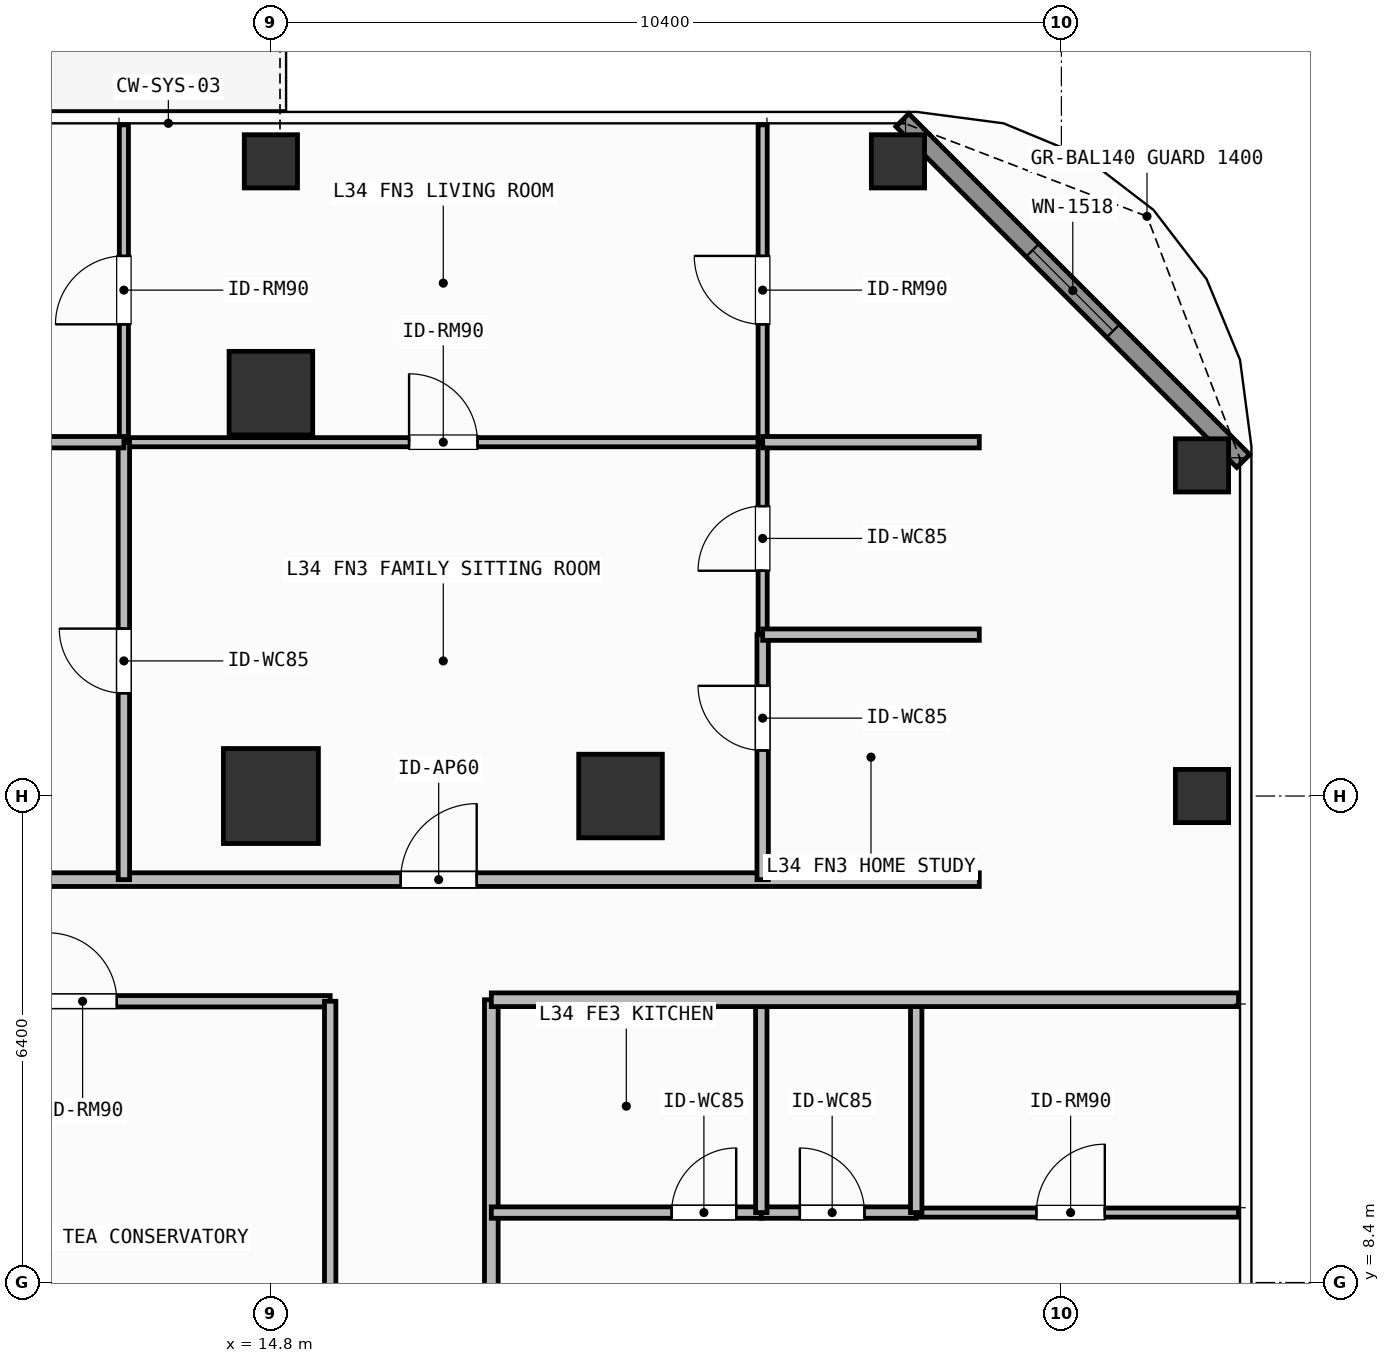
"""IFC4 building model, lengths in metres.
Left out: names, types, materials, properties, quantities, classifications, styles, units other than length and angle.
Written with IfcOpenShell. Run it as: python <this file> out.ifc"""

import sys

from ifc_helpers import new_model, si_unit, direction, frame, frame_2d, origin, origin_2d, place, context, subcontext, project, spatial, rectangle, hollow_rectangle, extrude, element, fill, save


model = new_model("IFC4")
c1 = context("Model", 3, precision=1e-05, world=origin(), true_north=direction((0.0, 1.0)))
c2 = subcontext(c1, "Body", "Model", "MODEL_VIEW")
j1 = project(units=[si_unit("LENGTHUNIT", "METRE"), si_unit("PLANEANGLEUNIT", "RADIAN")], contexts=[c1])
p1 = place(None, origin())
s1 = spatial("IfcSite", under=j1, at=p1, CompositionType="ELEMENT")
p2 = place(p1, origin())
s2 = spatial("IfcBuilding", under=s1, at=p2, CompositionType="ELEMENT")
p3 = place(p2, frame((0.0, 0.0, 136.8)))
s3 = spatial("IfcBuildingStorey", under=s2, at=p3, CompositionType="ELEMENT", Elevation=136.8)
p4 = place(p3, frame((14.8, 14.8, 0.0), z_axis=(0.0, 0.0, 1.0), x_axis=(1.0, 0.0, 0.0)))
e1 = element("IfcColumn", 1, at=p4, inside=s3, PredefinedType="COLUMN", context=c2, shape_type="SweptSolid", body=[
    extrude(rectangle(XDim=1.25, YDim=1.25, at=origin_2d()), origin(), (0.0, 0.0, 1.0), 3.9),
])
for number, where, z_axis, x_axis in (
    (2, (19.4, 14.8, 0.0), (0.0, 0.0, 1.0), (1.0, 0.0, 0.0)),
    (3, (14.8, 20.1, 0.0), (0.0, 0.0, 1.0), (1.0, 0.0, 0.0)),
):
    element("IfcColumn", number, at=place(p3, frame(where, z_axis=z_axis, x_axis=x_axis)), inside=s3, PredefinedType="COLUMN", context=c2, shape_type="SweptSolid", body=[
        extrude(rectangle(XDim=1.1, YDim=1.1, at=origin_2d()), origin(), (0.0, 0.0, 1.0), 3.9),
    ])
for number, where, z_axis, x_axis in (
    (4, (23.05, 23.15, 0.0), (0.0, 0.0, 1.0), (1.0, 0.0, 0.0)),
    (5, (27.05, 19.15, 0.0), (0.0, 0.0, 1.0), (1.0, 0.0, 0.0)),
    (6, (14.8, 23.15, 0.0), (0.0, 0.0, 1.0), (1.0, 0.0, 0.0)),
    (7, (27.05, 14.8, 0.0), (0.0, 0.0, 1.0), (1.0, 0.0, 0.0)),
):
    element("IfcColumn", number, at=place(p3, frame(where, z_axis=z_axis, x_axis=x_axis)), inside=s3, PredefinedType="COLUMN", context=c2, shape_type="SweptSolid", body=[
        extrude(hollow_rectangle(XDim=0.7, YDim=0.7, WallThickness=0.032, at=origin_2d()), origin(), (0.0, 0.0, 1.0), 3.9),
    ])
p5 = place(p3, frame((23.108, 23.692, 0.0), z_axis=(0.0, 0.0, 1.0), x_axis=(0.707087534163, -0.707126027686, 0.0)))
e8 = element("IfcWall", 8, at=p5, inside=s3, PredefinedType="SOLIDWALL", context=c2, shape_type="SweptSolid", body=[
    extrude(rectangle(XDim=6.342, YDim=0.24, at=frame_2d((3.171, 0.0))), origin(), (0.0, 0.0, 1.0), 3.68),
])
p6 = place(p5, frame((2.421, 0.0, 0.8)))
e9 = element("IfcOpeningElement", 9, at=p6, cuts=e8, PredefinedType="OPENING", context=c2, shape_type="SweptSolid", body=[
    extrude(rectangle(XDim=1.5, YDim=1.85, at=frame_2d((0.75, 0.925))), frame((0.0, 0.13, 0.0), z_axis=(0.0, -1.0, 0.0), x_axis=(1.0, 0.0, 0.0)), (0.0, 0.0, 1.0), 0.26),
])
p7 = place(p3, frame((8.36, 12.1, 0.0), z_axis=(0.0, 0.0, 1.0), x_axis=(1.0, 0.0, 0.0)))
e10 = element("IfcWall", 10, at=p7, inside=s3, PredefinedType="PARTITIONING", context=c2, shape_type="SweptSolid", body=[
    extrude(rectangle(XDim=7.22, YDim=0.15, at=frame_2d((3.61, 0.0))), origin(), (0.0, 0.0, 1.0), 3.68),
])
p8 = place(p7, frame((3.513, 0.0, 0.0)))
e11 = element("IfcOpeningElement", 11, at=p8, cuts=e10, PredefinedType="OPENING", context=c2, shape_type="SweptSolid", body=[
    extrude(rectangle(XDim=0.9, YDim=2.1, at=frame_2d((0.45, 1.05))), frame((0.0, 0.085, 0.0), z_axis=(0.0, -1.0, 0.0), x_axis=(1.0, 0.0, 0.0)), (0.0, 0.0, 1.0), 0.17),
])
p9 = place(p3, frame((8.82, 13.7, 0.0), z_axis=(0.0, 0.0, 1.0), x_axis=(1.0, 0.0, 0.0)))
e12 = element("IfcWall", 12, at=p9, inside=s3, PredefinedType="PARTITIONING", context=c2, shape_type="SweptSolid", body=[
    extrude(rectangle(XDim=15.3, YDim=0.18, at=frame_2d((7.65, 0.0))), origin(), (0.0, 0.0, 1.0), 3.68),
])
p10 = place(p9, frame((7.688, 0.0, 0.0)))
e13 = element("IfcOpeningElement", 13, at=p10, cuts=e12, PredefinedType="OPENING", context=c2, shape_type="SweptSolid", body=[
    extrude(rectangle(XDim=1.0, YDim=2.2, at=frame_2d((0.5, 1.1))), frame((0.0, 0.1, 0.0), z_axis=(0.0, -1.0, 0.0), x_axis=(1.0, 0.0, 0.0)), (0.0, 0.0, 1.0), 0.2),
])
p11 = place(p3, frame((12.866, 19.455, 0.0), z_axis=(0.0, 0.0, 1.0), x_axis=(1.0, 0.0, 0.0)))
e14 = element("IfcWall", 14, at=p11, inside=s3, PredefinedType="PARTITIONING", context=c2, shape_type="SweptSolid", body=[
    extrude(rectangle(XDim=8.404, YDim=0.12, at=frame_2d((4.202, 0.0))), origin(), (0.0, 0.0, 1.0), 3.68),
])
p12 = place(p11, frame((3.752, 0.0, 0.0)))
e15 = element("IfcOpeningElement", 15, at=p12, cuts=e14, PredefinedType="OPENING", context=c2, shape_type="SweptSolid", body=[
    extrude(rectangle(XDim=0.9, YDim=2.1, at=frame_2d((0.45, 1.05))), frame((0.0, 0.07, 0.0), z_axis=(0.0, -1.0, 0.0), x_axis=(1.0, 0.0, 0.0)), (0.0, 0.0, 1.0), 0.14),
])
p13 = place(p3, frame((12.866, 13.7, 0.0), z_axis=(0.0, 0.0, 1.0), x_axis=(0.0, 1.0, 0.0)))
e16 = element("IfcWall", 16, at=p13, inside=s3, PredefinedType="PARTITIONING", context=c2, shape_type="SweptSolid", body=[
    extrude(rectangle(XDim=5.755, YDim=0.15, at=frame_2d((2.877, 0.0))), origin(), (0.0, 0.0, 1.0), 3.68),
])
p14 = place(p13, frame((2.452, 0.0, 0.0)))
e17 = element("IfcOpeningElement", 17, at=p14, cuts=e16, PredefinedType="OPENING", context=c2, shape_type="SweptSolid", body=[
    extrude(rectangle(XDim=0.85, YDim=2.1, at=frame_2d((0.425, 1.05))), frame((0.0, 0.085, 0.0), z_axis=(0.0, -1.0, 0.0), x_axis=(1.0, 0.0, 0.0)), (0.0, 0.0, 1.0), 0.17),
])
p15 = place(p3, frame((12.866, 19.455, 0.0), z_axis=(0.0, 0.0, 1.0), x_axis=(0.0, 1.0, 0.0)))
e18 = element("IfcWall", 18, at=p15, inside=s3, PredefinedType="PARTITIONING", context=c2, shape_type="SweptSolid", body=[
    extrude(rectangle(XDim=4.175, YDim=0.12, at=frame_2d((2.087, 0.0))), origin(), (0.0, 0.0, 1.0), 3.68),
])
p16 = place(p15, frame((1.551, 0.0, 0.0)))
e19 = element("IfcOpeningElement", 19, at=p16, cuts=e18, PredefinedType="OPENING", context=c2, shape_type="SweptSolid", body=[
    extrude(rectangle(XDim=0.9, YDim=2.1, at=frame_2d((0.45, 1.05))), frame((0.0, 0.07, 0.0), z_axis=(0.0, -1.0, 0.0), x_axis=(1.0, 0.0, 0.0)), (0.0, 0.0, 1.0), 0.14),
])
p17 = place(p3, frame((21.27, 13.7, 0.0), z_axis=(0.0, 0.0, 1.0), x_axis=(0.0, 1.0, 0.0)))
e20 = element("IfcWall", 20, at=p17, inside=s3, PredefinedType="PARTITIONING", context=c2, shape_type="SweptSolid", body=[
    extrude(rectangle(XDim=3.223, YDim=0.15, at=frame_2d((1.612, 0.0))), origin(), (0.0, 0.0, 1.0), 3.68),
])
p18 = place(p17, frame((1.7, 0.0, 0.0)))
e21 = element("IfcOpeningElement", 21, at=p18, cuts=e20, PredefinedType="OPENING", context=c2, shape_type="SweptSolid", body=[
    extrude(rectangle(XDim=0.85, YDim=2.1, at=frame_2d((0.425, 1.05))), frame((0.0, 0.085, 0.0), z_axis=(0.0, -1.0, 0.0), x_axis=(1.0, 0.0, 0.0)), (0.0, 0.0, 1.0), 0.17),
])
p19 = place(p3, frame((21.27, 16.923, 0.0), z_axis=(0.0, 0.0, 1.0), x_axis=(0.0, 1.0, 0.0)))
e22 = element("IfcWall", 22, at=p19, inside=s3, PredefinedType="PARTITIONING", context=c2, shape_type="SweptSolid", body=[
    extrude(rectangle(XDim=2.532, YDim=0.12, at=frame_2d((1.266, 0.0))), origin(), (0.0, 0.0, 1.0), 3.68),
])
p20 = place(p19, frame((0.841, 0.0, 0.0)))
e23 = element("IfcOpeningElement", 23, at=p20, cuts=e22, PredefinedType="OPENING", context=c2, shape_type="SweptSolid", body=[
    extrude(rectangle(XDim=0.85, YDim=2.1, at=frame_2d((0.425, 1.05))), frame((0.0, 0.07, 0.0), z_axis=(0.0, -1.0, 0.0), x_axis=(1.0, 0.0, 0.0)), (0.0, 0.0, 1.0), 0.14),
])
p21 = place(p3, frame((21.27, 19.455, 0.0), z_axis=(0.0, 0.0, 1.0), x_axis=(0.0, 1.0, 0.0)))
e24 = element("IfcWall", 24, at=p21, inside=s3, PredefinedType="PARTITIONING", context=c2, shape_type="SweptSolid", body=[
    extrude(rectangle(XDim=4.175, YDim=0.12, at=frame_2d((2.087, 0.0))), origin(), (0.0, 0.0, 1.0), 3.68),
])
p22 = place(p21, frame((1.551, 0.0, 0.0)))
e25 = element("IfcOpeningElement", 25, at=p22, cuts=e24, PredefinedType="OPENING", context=c2, shape_type="SweptSolid", body=[
    extrude(rectangle(XDim=0.9, YDim=2.1, at=frame_2d((0.45, 1.05))), frame((0.0, 0.07, 0.0), z_axis=(0.0, -1.0, 0.0), x_axis=(1.0, 0.0, 0.0)), (0.0, 0.0, 1.0), 0.14),
])
p23 = place(p3, frame((17.7, 4.04, 0.0), z_axis=(0.0, 0.0, 1.0), x_axis=(0.0, 1.0, 0.0)))
e26 = element("IfcWall", 26, at=p23, inside=s3, PredefinedType="PARTITIONING", context=c2, shape_type="SweptSolid", body=[
    extrude(rectangle(XDim=8.08, YDim=0.18, at=frame_2d((4.04, 0.0))), origin(), (0.0, 0.0, 1.0), 3.68),
])
p24 = place(p23, frame((1.761, 0.0, 0.0)))
e27 = element("IfcOpeningElement", 27, at=p24, cuts=e26, PredefinedType="OPENING", context=c2, shape_type="SweptSolid", body=[
    extrude(rectangle(XDim=1.0, YDim=2.2, at=frame_2d((0.5, 1.1))), frame((0.0, 0.1, 0.0), z_axis=(0.0, -1.0, 0.0), x_axis=(1.0, 0.0, 0.0)), (0.0, 0.0, 1.0), 0.2),
])
p25 = place(p3, frame((17.7, 9.32, 0.0), z_axis=(0.0, 0.0, 1.0), x_axis=(1.0, 0.0, 0.0)))
e28 = element("IfcWall", 28, at=p25, inside=s3, PredefinedType="PARTITIONING", context=c2, shape_type="SweptSolid", body=[
    extrude(rectangle(XDim=3.552, YDim=0.15, at=frame_2d((1.776, 0.0))), origin(), (0.0, 0.0, 1.0), 3.68),
])
p26 = place(p25, frame((2.372, 0.0, 0.0)))
e29 = element("IfcOpeningElement", 29, at=p26, cuts=e28, PredefinedType="OPENING", context=c2, shape_type="SweptSolid", body=[
    extrude(rectangle(XDim=0.85, YDim=2.1, at=frame_2d((0.425, 1.05))), frame((0.0, 0.085, 0.0), z_axis=(0.0, -1.0, 0.0), x_axis=(1.0, 0.0, 0.0)), (0.0, 0.0, 1.0), 0.17),
])
p27 = place(p3, frame((21.252, 9.32, 0.0), z_axis=(0.0, 0.0, 1.0), x_axis=(1.0, 0.0, 0.0)))
e30 = element("IfcWall", 30, at=p27, inside=s3, PredefinedType="PARTITIONING", context=c2, shape_type="SweptSolid", body=[
    extrude(rectangle(XDim=2.038, YDim=0.15, at=frame_2d((1.019, 0.0))), origin(), (0.0, 0.0, 1.0), 3.68),
])
p28 = place(p27, frame((0.507, 0.0, 0.0)))
e31 = element("IfcOpeningElement", 31, at=p28, cuts=e30, PredefinedType="OPENING", context=c2, shape_type="SweptSolid", body=[
    extrude(rectangle(XDim=0.85, YDim=2.1, at=frame_2d((0.425, 1.05))), frame((0.0, 0.085, 0.0), z_axis=(0.0, -1.0, 0.0), x_axis=(1.0, 0.0, 0.0)), (0.0, 0.0, 1.0), 0.17),
])
p29 = place(p3, frame((23.29, 9.32, 0.0), z_axis=(0.0, 0.0, 1.0), x_axis=(1.0, 0.0, 0.0)))
e32 = element("IfcWall", 32, at=p29, inside=s3, PredefinedType="PARTITIONING", context=c2, shape_type="SweptSolid", body=[
    extrude(rectangle(XDim=4.24, YDim=0.12, at=frame_2d((2.12, 0.0))), origin(), (0.0, 0.0, 1.0), 3.68),
])
p30 = place(p29, frame((1.581, 0.0, 0.0)))
e33 = element("IfcOpeningElement", 33, at=p30, cuts=e32, PredefinedType="OPENING", context=c2, shape_type="SweptSolid", body=[
    extrude(rectangle(XDim=0.9, YDim=2.1, at=frame_2d((0.45, 1.05))), frame((0.0, 0.07, 0.0), z_axis=(0.0, -1.0, 0.0), x_axis=(1.0, 0.0, 0.0)), (0.0, 0.0, 1.0), 0.14),
])
p31 = place(p3, frame((15.58, 5.85, 0.0), z_axis=(0.0, 0.0, 1.0), x_axis=(0.0, 1.0, 0.0)))
e34 = element("IfcWall", 34, at=p31, inside=s3, PredefinedType="PARTITIONING", context=c2, shape_type="SweptSolid", body=[
    extrude(rectangle(XDim=6.25, YDim=0.15, at=frame_2d((3.125, 0.0))), origin(), (0.0, 0.0, 1.0), 3.68),
])
p32 = place(p3, frame((8.82, 19.455, 0.0), z_axis=(0.0, 0.0, 1.0), x_axis=(1.0, 0.0, 0.0)))
e35 = element("IfcWall", 35, at=p32, inside=s3, PredefinedType="PARTITIONING", context=c2, shape_type="SweptSolid", body=[
    extrude(rectangle(XDim=4.046, YDim=0.15, at=frame_2d((2.023, 0.0))), origin(), (0.0, 0.0, 1.0), 3.68),
])
for number, where, z_axis, x_axis in (
    (36, (21.27, 16.923, 0.0), (0.0, 0.0, 1.0), (1.0, 0.0, 0.0)),
    (37, (21.27, 19.455, 0.0), (0.0, 0.0, 1.0), (1.0, 0.0, 0.0)),
):
    element("IfcWall", number, at=place(p3, frame(where, z_axis=z_axis, x_axis=x_axis)), inside=s3, PredefinedType="PARTITIONING", context=c2, shape_type="SweptSolid", body=[
        extrude(rectangle(XDim=2.85, YDim=0.15, at=frame_2d((1.425, 0.0))), origin(), (0.0, 0.0, 1.0), 3.68),
    ])
for number, where, z_axis, x_axis in (
    (38, (21.252, 9.32, 0.0), (0.0, 0.0, 1.0), (0.0, 1.0, 0.0)),
    (39, (23.29, 9.32, 0.0), (0.0, 0.0, 1.0), (0.0, 1.0, 0.0)),
):
    element("IfcWall", number, at=place(p3, frame(where, z_axis=z_axis, x_axis=x_axis)), inside=s3, PredefinedType="PARTITIONING", context=c2, shape_type="SweptSolid", body=[
        extrude(rectangle(XDim=2.8, YDim=0.15, at=frame_2d((1.4, 0.0))), origin(), (0.0, 0.0, 1.0), 3.68),
    ])
p33 = place(p3, frame((17.7, 12.12, 0.0), z_axis=(0.0, 0.0, 1.0), x_axis=(1.0, 0.0, 0.0)))
e40 = element("IfcWall", 40, at=p33, inside=s3, PredefinedType="PARTITIONING", context=c2, shape_type="SweptSolid", body=[
    extrude(rectangle(XDim=9.83, YDim=0.18, at=frame_2d((4.915, 0.0))), origin(), (0.0, 0.0, 1.0), 3.68),
])
p34 = place(p6, origin())
e41 = element("IfcWindow", 41, at=p34, inside=s3, PartitioningType="SINGLE_PANEL", PredefinedType="WINDOW", context=c2, shape_type="SweptSolid", body=[
    extrude(rectangle(XDim=1.5, YDim=1.85, at=frame_2d((0.75, 0.925))), frame((0.0, 0.03, 0.0), z_axis=(0.0, -1.0, 0.0), x_axis=(1.0, 0.0, 0.0)), (0.0, 0.0, 1.0), 0.06),
])
fill(e9, e41)
p35 = place(p8, origin())
e42 = element("IfcDoor", 42, at=p35, inside=s3, OperationType="SINGLE_SWING_LEFT", PredefinedType="DOOR", context=c2, shape_type="SweptSolid", body=[
    extrude(rectangle(XDim=0.9, YDim=2.1, at=frame_2d((0.45, 1.05))), frame((0.0, 0.025, 0.0), z_axis=(0.0, -1.0, 0.0), x_axis=(1.0, 0.0, 0.0)), (0.0, 0.0, 1.0), 0.05),
])
fill(e11, e42)
p36 = place(p10, origin())
e43 = element("IfcDoor", 43, at=p36, inside=s3, OperationType="SINGLE_SWING_RIGHT", PredefinedType="DOOR", context=c2, shape_type="SweptSolid", body=[
    extrude(rectangle(XDim=1.0, YDim=2.2, at=frame_2d((0.5, 1.1))), frame((0.0, 0.025, 0.0), z_axis=(0.0, -1.0, 0.0), x_axis=(1.0, 0.0, 0.0)), (0.0, 0.0, 1.0), 0.05),
])
fill(e13, e43)
p37 = place(p12, origin())
e44 = element("IfcDoor", 44, at=p37, inside=s3, OperationType="SINGLE_SWING_LEFT", PredefinedType="DOOR", context=c2, shape_type="SweptSolid", body=[
    extrude(rectangle(XDim=0.9, YDim=2.1, at=frame_2d((0.45, 1.05))), frame((0.0, 0.025, 0.0), z_axis=(0.0, -1.0, 0.0), x_axis=(1.0, 0.0, 0.0)), (0.0, 0.0, 1.0), 0.05),
])
fill(e15, e44)
p38 = place(p14, origin())
e45 = element("IfcDoor", 45, at=p38, inside=s3, OperationType="SINGLE_SWING_RIGHT", PredefinedType="DOOR", context=c2, shape_type="SweptSolid", body=[
    extrude(rectangle(XDim=0.85, YDim=2.1, at=frame_2d((0.425, 1.05))), frame((0.0, 0.025, 0.0), z_axis=(0.0, -1.0, 0.0), x_axis=(1.0, 0.0, 0.0)), (0.0, 0.0, 1.0), 0.05),
])
fill(e17, e45)
p39 = place(p16, origin())
e46 = element("IfcDoor", 46, at=p39, inside=s3, OperationType="SINGLE_SWING_LEFT", PredefinedType="DOOR", context=c2, shape_type="SweptSolid", body=[
    extrude(rectangle(XDim=0.9, YDim=2.1, at=frame_2d((0.45, 1.05))), frame((0.0, 0.025, 0.0), z_axis=(0.0, -1.0, 0.0), x_axis=(1.0, 0.0, 0.0)), (0.0, 0.0, 1.0), 0.05),
])
fill(e19, e46)
p40 = place(p18, origin())
e47 = element("IfcDoor", 47, at=p40, inside=s3, OperationType="SINGLE_SWING_RIGHT", PredefinedType="DOOR", context=c2, shape_type="SweptSolid", body=[
    extrude(rectangle(XDim=0.85, YDim=2.1, at=frame_2d((0.425, 1.05))), frame((0.0, 0.025, 0.0), z_axis=(0.0, -1.0, 0.0), x_axis=(1.0, 0.0, 0.0)), (0.0, 0.0, 1.0), 0.05),
])
fill(e21, e47)
p41 = place(p20, origin())
e48 = element("IfcDoor", 48, at=p41, inside=s3, OperationType="SINGLE_SWING_LEFT", PredefinedType="DOOR", context=c2, shape_type="SweptSolid", body=[
    extrude(rectangle(XDim=0.85, YDim=2.1, at=frame_2d((0.425, 1.05))), frame((0.0, 0.025, 0.0), z_axis=(0.0, -1.0, 0.0), x_axis=(1.0, 0.0, 0.0)), (0.0, 0.0, 1.0), 0.05),
])
fill(e23, e48)
p42 = place(p22, origin())
e49 = element("IfcDoor", 49, at=p42, inside=s3, OperationType="SINGLE_SWING_RIGHT", PredefinedType="DOOR", context=c2, shape_type="SweptSolid", body=[
    extrude(rectangle(XDim=0.9, YDim=2.1, at=frame_2d((0.45, 1.05))), frame((0.0, 0.025, 0.0), z_axis=(0.0, -1.0, 0.0), x_axis=(1.0, 0.0, 0.0)), (0.0, 0.0, 1.0), 0.05),
])
fill(e25, e49)
p43 = place(p26, origin())
e50 = element("IfcDoor", 50, at=p43, inside=s3, OperationType="SINGLE_SWING_RIGHT", PredefinedType="DOOR", context=c2, shape_type="SweptSolid", body=[
    extrude(rectangle(XDim=0.85, YDim=2.1, at=frame_2d((0.425, 1.05))), frame((0.0, 0.025, 0.0), z_axis=(0.0, -1.0, 0.0), x_axis=(1.0, 0.0, 0.0)), (0.0, 0.0, 1.0), 0.05),
])
fill(e29, e50)
p44 = place(p28, origin())
e51 = element("IfcDoor", 51, at=p44, inside=s3, OperationType="SINGLE_SWING_LEFT", PredefinedType="DOOR", context=c2, shape_type="SweptSolid", body=[
    extrude(rectangle(XDim=0.85, YDim=2.1, at=frame_2d((0.425, 1.05))), frame((0.0, 0.025, 0.0), z_axis=(0.0, -1.0, 0.0), x_axis=(1.0, 0.0, 0.0)), (0.0, 0.0, 1.0), 0.05),
])
fill(e31, e51)
p45 = place(p30, origin())
e52 = element("IfcDoor", 52, at=p45, inside=s3, OperationType="SINGLE_SWING_RIGHT", PredefinedType="DOOR", context=c2, shape_type="SweptSolid", body=[
    extrude(rectangle(XDim=0.9, YDim=2.1, at=frame_2d((0.45, 1.05))), frame((0.0, 0.025, 0.0), z_axis=(0.0, -1.0, 0.0), x_axis=(1.0, 0.0, 0.0)), (0.0, 0.0, 1.0), 0.05),
])
fill(e33, e52)
save(model, sys.argv[1])
